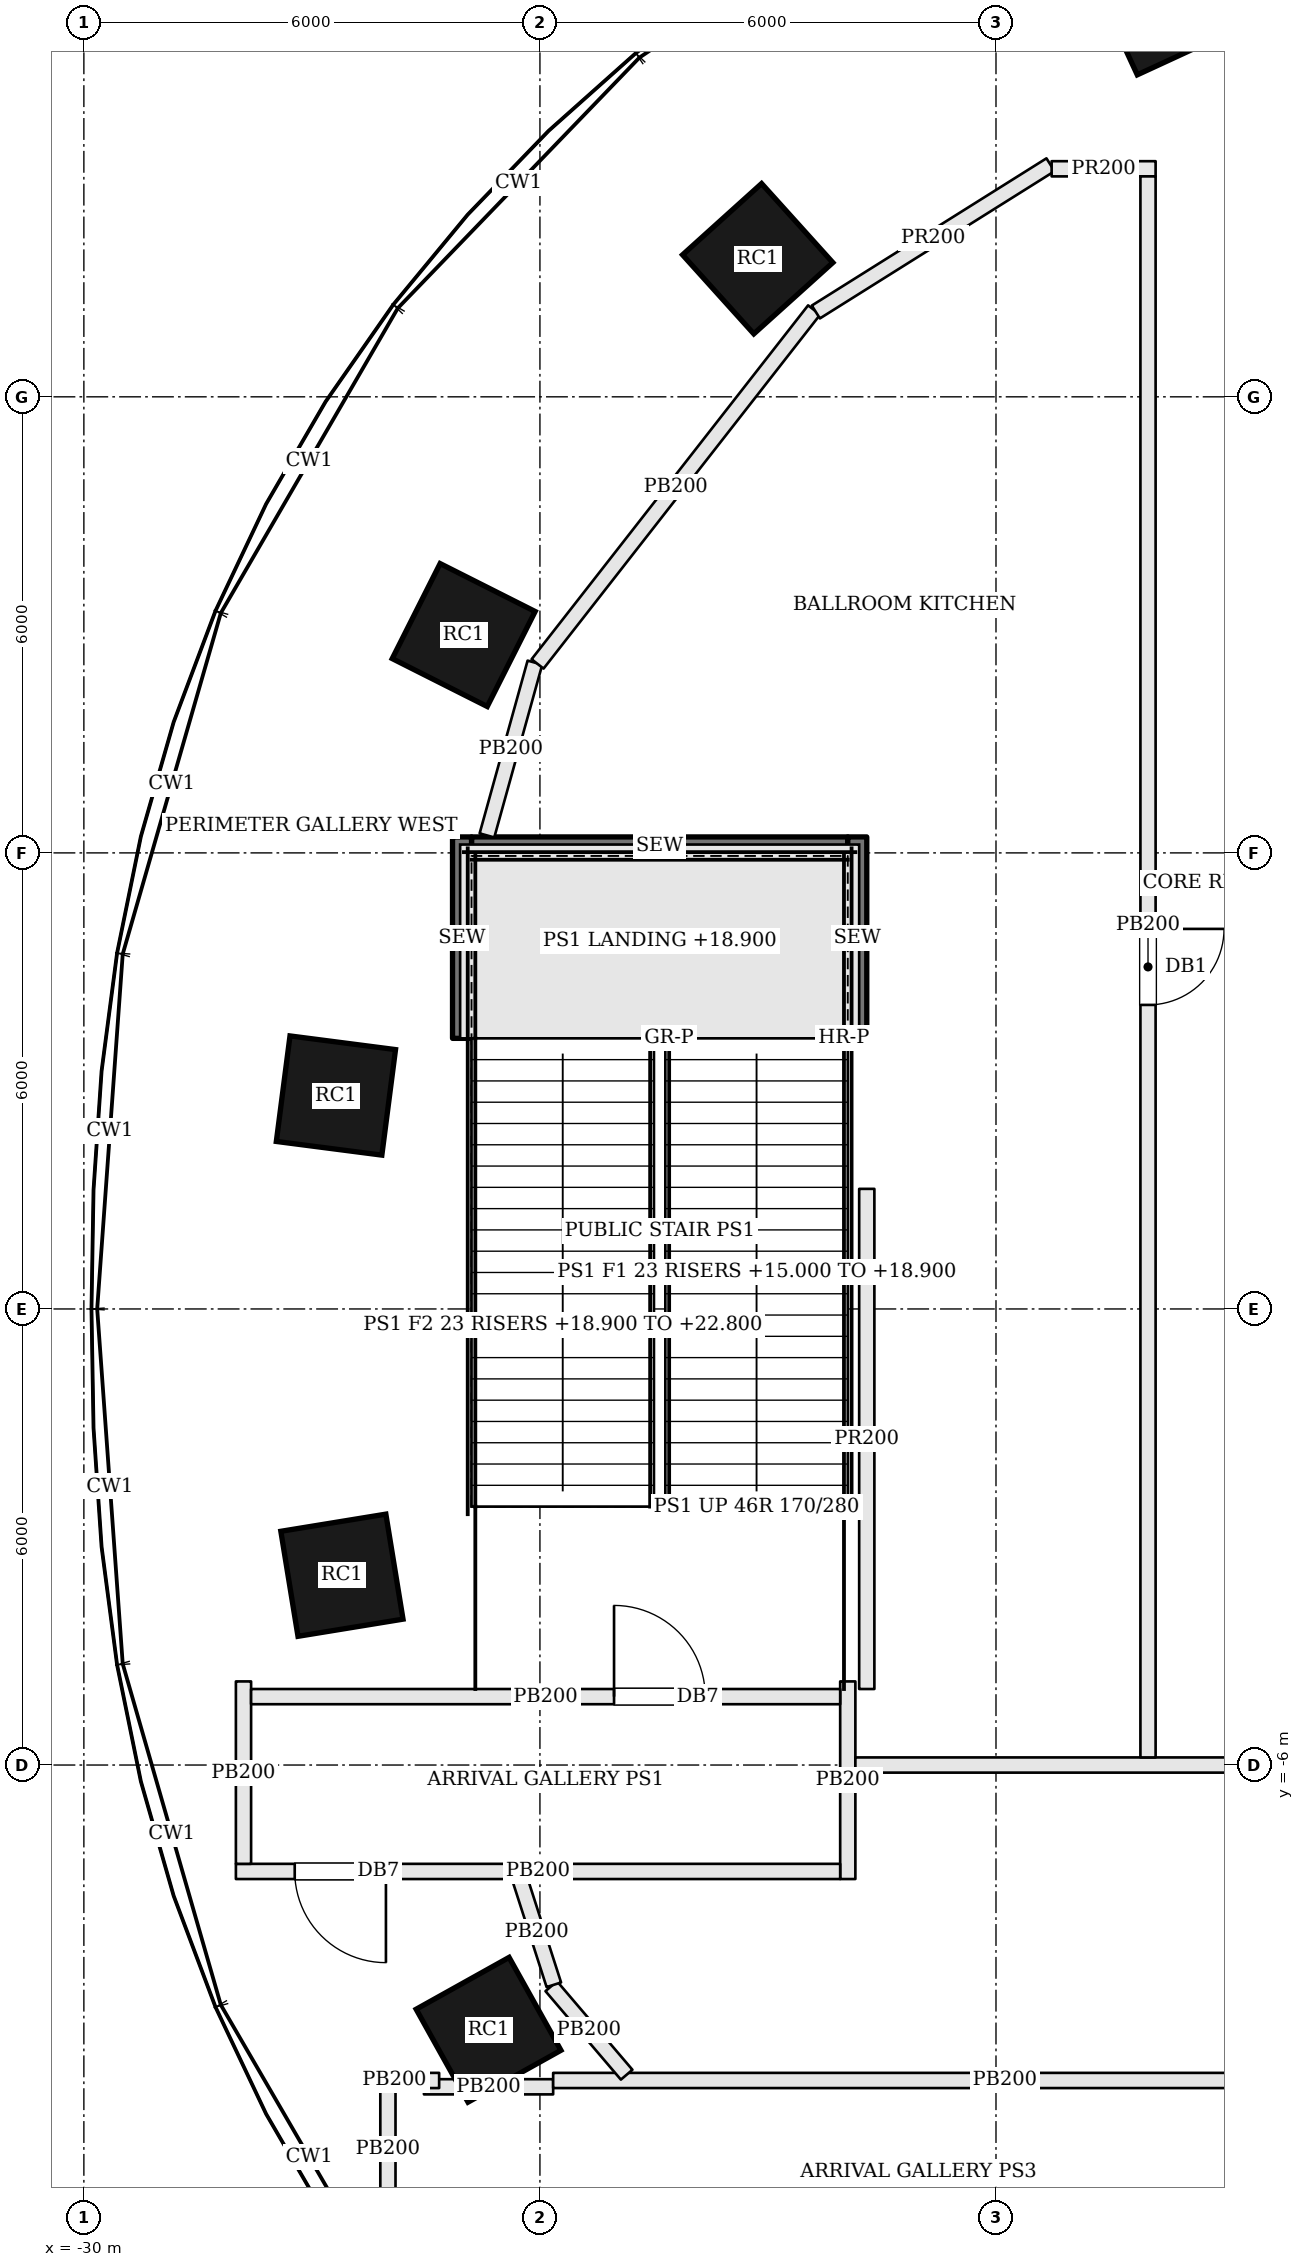
"""IFC4 building model, lengths in metres.
Left out: names, types, materials, properties, quantities, classifications, styles, units other than length and angle.
Written with IfcOpenShell. Run it as: python <this file> out.ifc"""

import sys

from ifc_helpers import new_model, si_unit, direction, frame, frame_2d, origin, origin_2d, place, context, subcontext, project, spatial, rectangle, extrude, element, fill, save


model = new_model("IFC4")
c1 = context("Model", 3, precision=1e-05, world=origin(), true_north=direction((0.0, 1.0)))
c2 = subcontext(c1, "Body", "Model", "MODEL_VIEW")
j1 = project(units=[si_unit("LENGTHUNIT", "METRE"), si_unit("PLANEANGLEUNIT", "RADIAN")], contexts=[c1])
p1 = place(None, origin())
s1 = spatial("IfcSite", under=j1, at=p1, CompositionType="ELEMENT")
p2 = place(p1, origin())
s2 = spatial("IfcBuilding", under=s1, at=p2, CompositionType="ELEMENT")
p3 = place(p2, frame((0.0, 0.0, 15.0)))
s3 = spatial("IfcBuildingStorey", under=s2, at=p3, CompositionType="ELEMENT", Elevation=15.0)
for number, where, z_axis, x_axis in (
    (1, (-15.799, 17.165, 0.0), (0.0, 0.0, 1.0), (-0.908, -0.419, 0.0)),
    (2, (-21.135, 13.817, 0.0), (0.0, 0.0, 1.0), (-0.743, -0.67, 0.0)),
    (3, (-25.003, 8.866, 0.0), (0.0, 0.0, 1.0), (-0.45, -0.893, 0.0)),
    (4, (-26.684, 2.808, 0.0), (0.0, 0.0, 1.0), (-0.128, -0.992, 0.0)),
    (5, (-26.605, -3.503, 0.0), (0.0, 0.0, 1.0), (0.161, -0.987, 0.0)),
    (6, (-24.676, -9.483, 0.0), (0.0, 0.0, 1.0), (0.487, -0.873, 0.0)),
):
    element("IfcColumn", number, at=place(p3, frame(where, z_axis=z_axis, x_axis=x_axis)), inside=s3, PredefinedType="COLUMN", context=c2, shape_type="SweptSolid", body=[
        extrude(rectangle(XDim=1.4, YDim=1.4, at=origin_2d()), origin(), (0.0, 0.0, 1.0), 7.8),
    ])
p4 = place(p3, frame((-19.95, -4.9, 0.0), z_axis=(0.0, 0.0, 1.0), x_axis=(0.0, -1.0, 0.0)))
e7 = element("IfcWall", 7, at=p4, inside=s3, PredefinedType="PARTITIONING", context=c2, shape_type="SweptSolid", body=[
    extrude(rectangle(XDim=2.6, YDim=0.2, at=frame_2d((1.3, 0.0))), origin(), (0.0, 0.0, 1.0), 6.83),
])
p5 = place(p3, frame((-20.05, -7.4, 0.0), z_axis=(0.0, 0.0, 1.0), x_axis=(-1.0, 0.0, 0.0)))
e8 = element("IfcWall", 8, at=p5, inside=s3, PredefinedType="PARTITIONING", context=c2, shape_type="SweptSolid", body=[
    extrude(rectangle(XDim=7.95, YDim=0.2, at=frame_2d((3.975, 0.0))), origin(), (0.0, 0.0, 1.0), 6.83),
])
p6 = place(p5, frame((5.976, 0.0, 0.0)))
e9 = element("IfcOpeningElement", 9, at=p6, cuts=e8, PredefinedType="OPENING", context=c2, shape_type="SweptSolid", body=[
    extrude(rectangle(XDim=1.2, YDim=2.1, at=frame_2d((0.6, 1.05))), frame((0.0, 0.11, 0.0), z_axis=(0.0, -1.0, 0.0), x_axis=(1.0, 0.0, 0.0)), (0.0, 0.0, 1.0), 0.22),
])
p7 = place(p3, frame((-27.9, -7.3, 0.0), z_axis=(0.0, 0.0, 1.0), x_axis=(0.0, 1.0, 0.0)))
e10 = element("IfcWall", 10, at=p7, inside=s3, PredefinedType="PARTITIONING", context=c2, shape_type="SweptSolid", body=[
    extrude(rectangle(XDim=2.4, YDim=0.2, at=frame_2d((1.2, 0.0))), origin(), (0.0, 0.0, 1.0), 6.83),
])
p8 = place(p3, frame((-27.8, -5.1, 0.0), z_axis=(0.0, 0.0, 1.0), x_axis=(1.0, 0.0, 0.0)))
e11 = element("IfcWall", 11, at=p8, inside=s3, PredefinedType="PARTITIONING", context=c2, shape_type="SweptSolid", body=[
    extrude(rectangle(XDim=7.75, YDim=0.2, at=frame_2d((3.875, 0.0))), origin(), (0.0, 0.0, 1.0), 6.83),
])
p9 = place(p8, frame((4.775, 0.0, 0.0)))
e12 = element("IfcOpeningElement", 12, at=p9, cuts=e11, PredefinedType="OPENING", context=c2, shape_type="SweptSolid", body=[
    extrude(rectangle(XDim=1.2, YDim=2.1, at=frame_2d((0.6, 1.05))), frame((0.0, 0.11, 0.0), z_axis=(0.0, -1.0, 0.0), x_axis=(1.0, 0.0, 0.0)), (0.0, 0.0, 1.0), 0.22),
])
p10 = place(p3, frame((-25.526, -10.233, 0.0), z_axis=(0.0, 0.0, 1.0), x_axis=(1.0, 0.0, 0.0)))
e13 = element("IfcWall", 13, at=p10, inside=s3, PredefinedType="PARTITIONING", context=c2, shape_type="SweptSolid", body=[
    extrude(rectangle(XDim=1.7, YDim=0.2, at=frame_2d((0.85, 0.0))), origin(), (0.0, 0.0, 1.0), 6.83),
])
p11 = place(p3, frame((-23.826, -10.15, 0.0), z_axis=(0.0, 0.0, 1.0), x_axis=(1.0, 0.0, 0.0)))
e14 = element("IfcWall", 14, at=p11, inside=s3, PredefinedType="PARTITIONING", context=c2, shape_type="SweptSolid", body=[
    extrude(rectangle(XDim=11.886, YDim=0.2, at=frame_2d((5.943, 0.0))), origin(), (0.0, 0.0, 1.0), 6.83),
])
p12 = place(p3, frame((-26.0, -12.063, 0.0), z_axis=(0.0, 0.0, 1.0), x_axis=(0.0, 1.0, 0.0)))
e15 = element("IfcWall", 15, at=p12, inside=s3, PredefinedType="PARTITIONING", context=c2, shape_type="SweptSolid", body=[
    extrude(rectangle(XDim=2.013, YDim=0.2, at=frame_2d((1.006, 0.0))), origin(), (0.0, 0.0, 1.0), 6.83),
])
p13 = place(p3, frame((-25.9, -10.15, 0.0), z_axis=(0.0, 0.0, 1.0), x_axis=(1.0, 0.0, 0.0)))
e16 = element("IfcWall", 16, at=p13, inside=s3, PredefinedType="PARTITIONING", context=c2, shape_type="SweptSolid", body=[
    extrude(rectangle(XDim=0.574, YDim=0.2, at=frame_2d((0.287, 0.0))), origin(), (0.0, 0.0, 1.0), 6.83),
])
p14 = place(p3, frame((-19.85, -6.0, 0.0), z_axis=(0.0, 0.0, 1.0), x_axis=(1.0, 0.0, 0.0)))
e17 = element("IfcWall", 17, at=p14, inside=s3, PredefinedType="PARTITIONING", context=c2, shape_type="SweptSolid", body=[
    extrude(rectangle(XDim=39.7, YDim=0.2, at=frame_2d((19.85, 0.0))), origin(), (0.0, 0.0, 1.0), 6.83),
])
p15 = place(p14, frame((13.172, 0.0, 0.0)))
e18 = element("IfcOpeningElement", 18, at=p15, cuts=e17, PredefinedType="OPENING", context=c2, shape_type="SweptSolid", body=[
    extrude(rectangle(XDim=1.2, YDim=2.1, at=frame_2d((0.6, 1.05))), frame((0.0, 0.11, 0.0), z_axis=(0.0, -1.0, 0.0), x_axis=(1.0, 0.0, 0.0)), (0.0, 0.0, 1.0), 0.22),
])
p16 = place(p14, frame((24.211, 0.0, 0.0)))
e19 = element("IfcOpeningElement", 19, at=p16, cuts=e17, PredefinedType="OPENING", context=c2, shape_type="SweptSolid", body=[
    extrude(rectangle(XDim=2.4, YDim=2.4, at=frame_2d((1.2, 1.2))), frame((0.0, 0.11, 0.0), z_axis=(0.0, -1.0, 0.0), x_axis=(1.0, 0.0, 0.0)), (0.0, 0.0, 1.0), 0.22),
])
p17 = place(p14, frame((7.011, 0.0, 0.0)))
e20 = element("IfcOpeningElement", 20, at=p17, cuts=e17, PredefinedType="OPENING", context=c2, shape_type="SweptSolid", body=[
    extrude(rectangle(XDim=2.4, YDim=2.4, at=frame_2d((1.2, 1.2))), frame((0.0, 0.11, 0.0), z_axis=(0.0, -1.0, 0.0), x_axis=(1.0, 0.0, 0.0)), (0.0, 0.0, 1.0), 0.22),
])
p18 = place(p3, frame((-19.7, -5.0, 0.0), z_axis=(0.0, 0.0, 1.0), x_axis=(0.0, 1.0, 0.0)))
e21 = element("IfcWall", 21, at=p18, inside=s3, PredefinedType="PARTITIONING", context=c2, shape_type="SweptSolid", body=[
    extrude(rectangle(XDim=6.58, YDim=0.2, at=frame_2d((3.29, 0.0))), origin(), (0.0, 0.0, 1.0), 6.934),
])
p19 = place(p3, frame((-24.697, 6.23, 0.0), z_axis=(0.0, 0.0, 1.0), x_axis=(0.267537104114, 0.963547558724, 0.0)))
e22 = element("IfcWall", 22, at=p19, inside=s3, PredefinedType="PARTITIONING", context=c2, shape_type="SweptSolid", body=[
    extrude(rectangle(XDim=2.359, YDim=0.2, at=frame_2d((1.179, 0.0))), origin(), (0.0, 0.0, 1.0), 6.83),
])
p20 = place(p3, frame((-24.031, 8.486, 0.0), z_axis=(0.0, 0.0, 1.0), x_axis=(0.615689744566, 0.787988666439, 0.0)))
e23 = element("IfcWall", 23, at=p20, inside=s3, PredefinedType="PARTITIONING", context=c2, shape_type="SweptSolid", body=[
    extrude(rectangle(XDim=5.909, YDim=0.2, at=frame_2d((2.954, 0.0))), origin(), (0.0, 0.0, 1.0), 6.83),
])
p21 = place(p3, frame((-20.37, 13.116, 0.0), z_axis=(0.0, 0.0, 1.0), x_axis=(0.847067442561, 0.531485416313, 0.0)))
e24 = element("IfcWall", 24, at=p21, inside=s3, PredefinedType="PARTITIONING", context=c2, shape_type="SweptSolid", body=[
    extrude(rectangle(XDim=3.645, YDim=0.2, at=frame_2d((1.822, 0.0))), origin(), (0.0, 0.0, 1.0), 6.934),
])
p22 = place(p3, frame((-17.268, 15.0, 0.0), z_axis=(0.0, 0.0, 1.0), x_axis=(1.0, 0.0, 0.0)))
e25 = element("IfcWall", 25, at=p22, inside=s3, PredefinedType="PARTITIONING", context=c2, shape_type="SweptSolid", body=[
    extrude(rectangle(XDim=1.368, YDim=0.2, at=frame_2d((0.684, 0.0))), origin(), (0.0, 0.0, 1.0), 6.934),
])
p23 = place(p3, frame((-16.0, 14.9, 0.0), z_axis=(0.0, 0.0, 1.0), x_axis=(0.0, -1.0, 0.0)))
e26 = element("IfcWall", 26, at=p23, inside=s3, PredefinedType="PARTITIONING", context=c2, shape_type="SweptSolid", body=[
    extrude(rectangle(XDim=20.8, YDim=0.2, at=frame_2d((10.4, 0.0))), origin(), (0.0, 0.0, 1.0), 6.83),
])
p24 = place(p23, frame((9.9, 0.0, 0.0)))
e27 = element("IfcOpeningElement", 27, at=p24, cuts=e26, PredefinedType="OPENING", context=c2, shape_type="SweptSolid", body=[
    extrude(rectangle(XDim=1.0, YDim=2.1, at=frame_2d((0.5, 1.05))), frame((0.0, 0.11, 0.0), z_axis=(0.0, -1.0, 0.0), x_axis=(1.0, 0.0, 0.0)), (0.0, 0.0, 1.0), 0.22),
])
p25 = place(p3, frame((-22.859, -10.074, 0.0), z_axis=(0.0, 0.0, 1.0), x_axis=(-0.648685680777, 0.761056428628, 0.0)))
e28 = element("IfcWall", 28, at=p25, inside=s3, PredefinedType="PARTITIONING", context=c2, shape_type="SweptSolid", body=[
    extrude(rectangle(XDim=1.53, YDim=0.2, at=frame_2d((0.765, 0.0))), origin(), (0.0, 0.0, 1.0), 6.83),
])
p26 = place(p3, frame((-23.817, -8.891, 0.0), z_axis=(0.0, 0.0, 1.0), x_axis=(-0.306321721395, 0.951928045076, 0.0)))
e29 = element("IfcWall", 29, at=p26, inside=s3, PredefinedType="PARTITIONING", context=c2, shape_type="SweptSolid", body=[
    extrude(rectangle(XDim=1.467, YDim=0.2, at=frame_2d((0.733, 0.0))), origin(), (0.0, 0.0, 1.0), 6.83),
])
p27 = place(p3, frame((-19.95, 6.085, 0.0), z_axis=(0.0, 0.0, 1.0), x_axis=(-1.0, 0.0, 0.0)))
e30 = element("IfcWall", 30, at=p27, inside=s3, PredefinedType="SOLIDWALL", context=c2, shape_type="SweptSolid", body=[
    extrude(rectangle(XDim=4.95, YDim=0.25, at=frame_2d((2.475, 0.0))), origin(), (0.0, 0.0, 1.0), 7.55),
])
for number, where, z_axis, x_axis in (
    (31, (-25.025, 3.56, 0.0), (0.0, 0.0, 1.0), (0.0, 1.0, 0.0)),
    (32, (-19.825, 3.56, 0.0), (0.0, 0.0, 1.0), (0.0, 1.0, 0.0)),
):
    element("IfcWall", number, at=place(p3, frame(where, z_axis=z_axis, x_axis=x_axis)), inside=s3, PredefinedType="SOLIDWALL", context=c2, shape_type="SweptSolid", body=[
        extrude(rectangle(XDim=2.65, YDim=0.25, at=frame_2d((1.325, 0.0))), origin(), (0.0, 0.0, 1.0), 7.55),
    ])
p28 = place(p9, origin())
e33 = element("IfcDoor", 33, at=p28, inside=s3, OperationType="SINGLE_SWING_LEFT", PredefinedType="DOOR", context=c2, shape_type="SweptSolid", body=[
    extrude(rectangle(XDim=1.2, YDim=2.1, at=frame_2d((0.6, 1.05))), frame((0.0, 0.025, 0.0), z_axis=(0.0, -1.0, 0.0), x_axis=(1.0, 0.0, 0.0)), (0.0, 0.0, 1.0), 0.05),
])
fill(e12, e33)
p29 = place(p6, origin())
e34 = element("IfcDoor", 34, at=p29, inside=s3, OperationType="SINGLE_SWING_LEFT", PredefinedType="DOOR", context=c2, shape_type="SweptSolid", body=[
    extrude(rectangle(XDim=1.2, YDim=2.1, at=frame_2d((0.6, 1.05))), frame((0.0, 0.025, 0.0), z_axis=(0.0, -1.0, 0.0), x_axis=(1.0, 0.0, 0.0)), (0.0, 0.0, 1.0), 0.05),
])
fill(e9, e34)
p30 = place(p24, origin())
e35 = element("IfcDoor", 35, at=p30, inside=s3, OperationType="SINGLE_SWING_LEFT", PredefinedType="DOOR", context=c2, shape_type="SweptSolid", body=[
    extrude(rectangle(XDim=1.0, YDim=2.1, at=frame_2d((0.5, 1.05))), frame((0.0, 0.025, 0.0), z_axis=(0.0, -1.0, 0.0), x_axis=(1.0, 0.0, 0.0)), (0.0, 0.0, 1.0), 0.05),
])
fill(e27, e35)
save(model, sys.argv[1])
